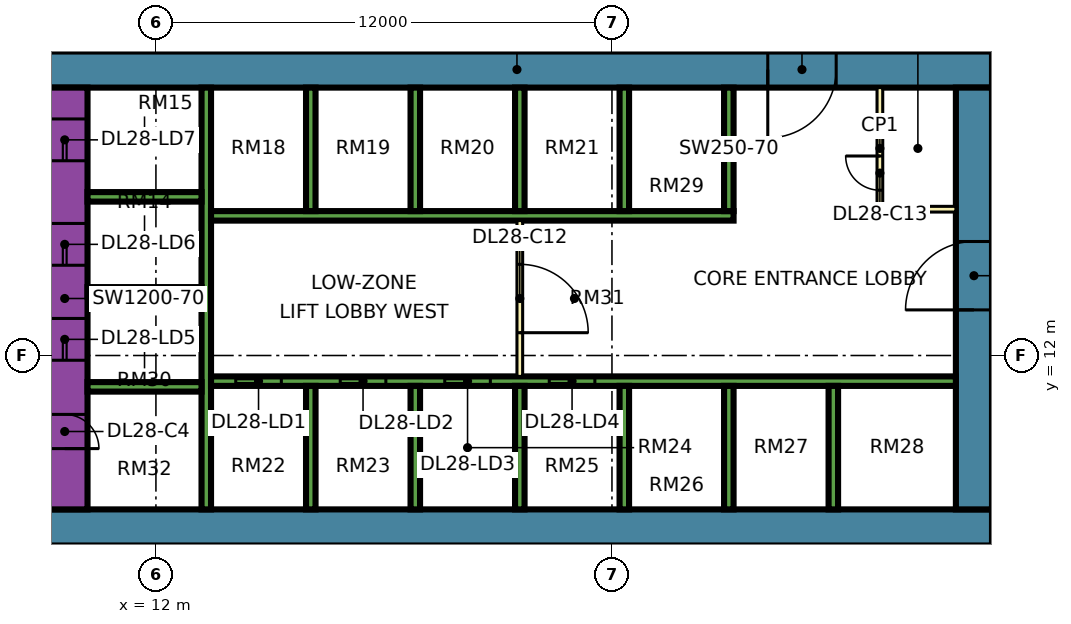
"""IFC4 building model, lengths in metres.
Left out: names, types, materials, properties, quantities, classifications, styles, units other than length and angle.
Written with IfcOpenShell. Run it as: python <this file> out.ifc"""

import sys

from ifc_helpers import new_model, si_unit, direction, frame, frame_2d, origin, place, context, subcontext, project, spatial, rectangle, extrude, element, fill, save


model = new_model("IFC4")
c1 = context("Model", 3, precision=1e-05, world=origin(), true_north=direction((0.0, 1.0)))
c2 = subcontext(c1, "Body", "Model", "MODEL_VIEW")
j1 = project(units=[si_unit("LENGTHUNIT", "METRE"), si_unit("PLANEANGLEUNIT", "RADIAN")], contexts=[c1])
p1 = place(None, origin())
s1 = spatial("IfcSite", under=j1, at=p1, CompositionType="ELEMENT")
p2 = place(p1, origin())
s2 = spatial("IfcBuilding", under=s1, at=p2, CompositionType="ELEMENT")
p3 = place(p2, frame((0.0, 0.0, 121.9)))
s3 = spatial("IfcBuildingStorey", under=s2, at=p3, CompositionType="ELEMENT", Elevation=121.9)
p4 = place(p3, frame((9.0, 7.475, 0.0), z_axis=(0.0, 0.0, 1.0), x_axis=(1.0, 0.0, 0.0)))
e1 = element("IfcWall", 1, at=p4, inside=s3, PredefinedType="SHEAR", context=c2, shape_type="SweptSolid", body=[
    extrude(rectangle(XDim=25.0, YDim=0.95, at=frame_2d((12.5, 0.0))), origin(), (0.0, 0.0, 1.0), 3.75),
])
p5 = place(p3, frame((9.0, 19.525, 0.0), z_axis=(0.0, 0.0, 1.0), x_axis=(1.0, 0.0, 0.0)))
e2 = element("IfcWall", 2, at=p5, inside=s3, PredefinedType="SHEAR", context=c2, shape_type="SweptSolid", body=[
    extrude(rectangle(XDim=25.0, YDim=0.95, at=frame_2d((12.5, 0.0))), origin(), (0.0, 0.0, 1.0), 3.75),
])
p6 = place(p5, frame((19.1, 0.0, 0.0)))
e3 = element("IfcOpeningElement", 3, at=p6, cuts=e2, PredefinedType="OPENING", context=c2, shape_type="SweptSolid", body=[
    extrude(rectangle(XDim=1.8, YDim=2.4, at=frame_2d((0.9, 1.2))), frame((0.0, 0.485, 0.0), z_axis=(0.0, -1.0, 0.0), x_axis=(1.0, 0.0, 0.0)), (0.0, 0.0, 1.0), 0.97),
])
p7 = place(p3, frame((9.6, 7.95, 0.0), z_axis=(0.0, 0.0, 1.0), x_axis=(0.0, 1.0, 0.0)))
e4 = element("IfcWall", 4, at=p7, inside=s3, PredefinedType="SHEAR", context=c2, shape_type="SweptSolid", body=[
    extrude(rectangle(XDim=11.1, YDim=1.2, at=frame_2d((5.55, 0.0))), origin(), (0.0, 0.0, 1.0), 3.75),
])
p8 = place(p7, frame((3.925, 0.0, 0.0)))
e5 = element("IfcOpeningElement", 5, at=p8, cuts=e4, PredefinedType="OPENING", context=c2, shape_type="SweptSolid", body=[
    extrude(rectangle(XDim=1.1, YDim=2.2, at=frame_2d((0.55, 1.1))), frame((0.0, 0.61, 0.0), z_axis=(0.0, -1.0, 0.0), x_axis=(1.0, 0.0, 0.0)), (0.0, 0.0, 1.0), 1.22),
])
p9 = place(p7, frame((6.425, 0.0, 0.0)))
e6 = element("IfcOpeningElement", 6, at=p9, cuts=e4, PredefinedType="OPENING", context=c2, shape_type="SweptSolid", body=[
    extrude(rectangle(XDim=1.1, YDim=2.2, at=frame_2d((0.55, 1.1))), frame((0.0, 0.61, 0.0), z_axis=(0.0, -1.0, 0.0), x_axis=(1.0, 0.0, 0.0)), (0.0, 0.0, 1.0), 1.22),
])
p10 = place(p7, frame((9.175, 0.0, 0.0)))
e7 = element("IfcOpeningElement", 7, at=p10, cuts=e4, PredefinedType="OPENING", context=c2, shape_type="SweptSolid", body=[
    extrude(rectangle(XDim=1.1, YDim=2.2, at=frame_2d((0.55, 1.1))), frame((0.0, 0.61, 0.0), z_axis=(0.0, -1.0, 0.0), x_axis=(1.0, 0.0, 0.0)), (0.0, 0.0, 1.0), 1.22),
])
p11 = place(p7, frame((1.6, 0.0, 0.0)))
e8 = element("IfcOpeningElement", 8, at=p11, cuts=e4, PredefinedType="OPENING", context=c2, shape_type="SweptSolid", body=[
    extrude(rectangle(XDim=0.9, YDim=2.1, at=frame_2d((0.45, 1.05))), frame((0.0, 0.61, 0.0), z_axis=(0.0, -1.0, 0.0), x_axis=(1.0, 0.0, 0.0)), (0.0, 0.0, 1.0), 1.22),
])
p12 = place(p3, frame((33.525, 7.95, 0.0), z_axis=(0.0, 0.0, 1.0), x_axis=(0.0, 1.0, 0.0)))
e9 = element("IfcWall", 9, at=p12, inside=s3, PredefinedType="SHEAR", context=c2, shape_type="SweptSolid", body=[
    extrude(rectangle(XDim=11.1, YDim=0.95, at=frame_2d((5.55, 0.0))), origin(), (0.0, 0.0, 1.0), 3.75),
])
p13 = place(p12, frame((5.25, 0.0, 0.0)))
e10 = element("IfcOpeningElement", 10, at=p13, cuts=e9, PredefinedType="OPENING", context=c2, shape_type="SweptSolid", body=[
    extrude(rectangle(XDim=1.8, YDim=2.4, at=frame_2d((0.9, 1.2))), frame((0.0, 0.485, 0.0), z_axis=(0.0, -1.0, 0.0), x_axis=(1.0, 0.0, 0.0)), (0.0, 0.0, 1.0), 0.97),
])
p14 = place(p3, frame((13.325, 7.95, 0.0), z_axis=(0.0, 0.0, 1.0), x_axis=(0.0, 1.0, 0.0)))
e11 = element("IfcWall", 11, at=p14, inside=s3, PredefinedType="SHEAR", context=c2, shape_type="SweptSolid", body=[
    extrude(rectangle(XDim=11.1, YDim=0.25, at=frame_2d((5.55, 0.0))), origin(), (0.0, 0.0, 1.0), 3.75),
])
p15 = place(p3, frame((13.45, 11.325, 0.0), z_axis=(0.0, 0.0, 1.0), x_axis=(1.0, 0.0, 0.0)))
e12 = element("IfcWall", 12, at=p15, inside=s3, PredefinedType="SHEAR", context=c2, shape_type="SweptSolid", body=[
    extrude(rectangle(XDim=19.6, YDim=0.25, at=frame_2d((9.8, 0.0))), origin(), (0.0, 0.0, 1.0), 3.75),
])
p16 = place(p15, frame((0.65, 0.0, 0.0)))
e13 = element("IfcOpeningElement", 13, at=p16, cuts=e12, PredefinedType="OPENING", context=c2, shape_type="SweptSolid", body=[
    extrude(rectangle(XDim=1.2, YDim=2.2, at=frame_2d((0.6, 1.1))), frame((0.0, 0.135, 0.0), z_axis=(0.0, -1.0, 0.0), x_axis=(1.0, 0.0, 0.0)), (0.0, 0.0, 1.0), 0.27),
])
p17 = place(p15, frame((3.4, 0.0, 0.0)))
e14 = element("IfcOpeningElement", 14, at=p17, cuts=e12, PredefinedType="OPENING", context=c2, shape_type="SweptSolid", body=[
    extrude(rectangle(XDim=1.2, YDim=2.2, at=frame_2d((0.6, 1.1))), frame((0.0, 0.135, 0.0), z_axis=(0.0, -1.0, 0.0), x_axis=(1.0, 0.0, 0.0)), (0.0, 0.0, 1.0), 0.27),
])
p18 = place(p15, frame((6.15, 0.0, 0.0)))
e15 = element("IfcOpeningElement", 15, at=p18, cuts=e12, PredefinedType="OPENING", context=c2, shape_type="SweptSolid", body=[
    extrude(rectangle(XDim=1.2, YDim=2.2, at=frame_2d((0.6, 1.1))), frame((0.0, 0.135, 0.0), z_axis=(0.0, -1.0, 0.0), x_axis=(1.0, 0.0, 0.0)), (0.0, 0.0, 1.0), 0.27),
])
p19 = place(p15, frame((8.9, 0.0, 0.0)))
e16 = element("IfcOpeningElement", 16, at=p19, cuts=e12, PredefinedType="OPENING", context=c2, shape_type="SweptSolid", body=[
    extrude(rectangle(XDim=1.2, YDim=2.2, at=frame_2d((0.6, 1.1))), frame((0.0, 0.135, 0.0), z_axis=(0.0, -1.0, 0.0), x_axis=(1.0, 0.0, 0.0)), (0.0, 0.0, 1.0), 0.27),
])
p20 = place(p3, frame((13.45, 15.675, 0.0), z_axis=(0.0, 0.0, 1.0), x_axis=(1.0, 0.0, 0.0)))
e17 = element("IfcWall", 17, at=p20, inside=s3, PredefinedType="SHEAR", context=c2, shape_type="SweptSolid", body=[
    extrude(rectangle(XDim=13.75, YDim=0.25, at=frame_2d((6.875, 0.0))), origin(), (0.0, 0.0, 1.0), 3.75),
])
for number, where, z_axis, x_axis in (
    (18, (10.2, 11.175, 0.0), (0.0, 0.0, 1.0), (1.0, 0.0, 0.0)),
    (19, (10.2, 13.675, 0.0), (0.0, 0.0, 1.0), (1.0, 0.0, 0.0)),
    (20, (10.2, 16.175, 0.0), (0.0, 0.0, 1.0), (1.0, 0.0, 0.0)),
):
    element("IfcWall", number, at=place(p3, frame(where, z_axis=z_axis, x_axis=x_axis)), inside=s3, PredefinedType="SHEAR", context=c2, shape_type="SweptSolid", body=[
        extrude(rectangle(XDim=3.0, YDim=0.25, at=frame_2d((1.5, 0.0))), origin(), (0.0, 0.0, 1.0), 3.75),
    ])
for number, where, z_axis, x_axis in (
    (21, (16.075, 7.95, 0.0), (0.0, 0.0, 1.0), (0.0, 1.0, 0.0)),
    (22, (18.825, 7.95, 0.0), (0.0, 0.0, 1.0), (0.0, 1.0, 0.0)),
    (23, (21.575, 7.95, 0.0), (0.0, 0.0, 1.0), (0.0, 1.0, 0.0)),
    (24, (24.325, 7.95, 0.0), (0.0, 0.0, 1.0), (0.0, 1.0, 0.0)),
    (25, (27.075, 7.95, 0.0), (0.0, 0.0, 1.0), (0.0, 1.0, 0.0)),
    (26, (29.825, 7.95, 0.0), (0.0, 0.0, 1.0), (0.0, 1.0, 0.0)),
    (27, (16.075, 15.8, 0.0), (0.0, 0.0, 1.0), (0.0, 1.0, 0.0)),
    (28, (18.825, 15.8, 0.0), (0.0, 0.0, 1.0), (0.0, 1.0, 0.0)),
    (29, (21.575, 15.8, 0.0), (0.0, 0.0, 1.0), (0.0, 1.0, 0.0)),
    (30, (24.325, 15.8, 0.0), (0.0, 0.0, 1.0), (0.0, 1.0, 0.0)),
    (31, (27.075, 15.8, 0.0), (0.0, 0.0, 1.0), (0.0, 1.0, 0.0)),
):
    element("IfcWall", number, at=place(p3, frame(where, z_axis=z_axis, x_axis=x_axis)), inside=s3, PredefinedType="SHEAR", context=c2, shape_type="SweptSolid", body=[
        extrude(rectangle(XDim=3.25, YDim=0.25, at=frame_2d((1.625, 0.0))), origin(), (0.0, 0.0, 1.0), 3.75),
    ])
p21 = place(p3, frame((-1.447, 12.553, 0.0), z_axis=(0.0, 0.0, 1.0), x_axis=(0.707106781187, -0.707106781187, 0.0)))
e32 = element("IfcWall", 32, at=p21, inside=s3, PredefinedType="SOLIDWALL", context=c2, shape_type="SweptSolid", body=[
    extrude(rectangle(XDim=19.799, YDim=0.15, at=frame_2d((9.899, 0.0))), origin(), (0.0, 0.0, 1.0), 3.35),
])
p22 = place(p21, frame((2.212, 0.0, 0.45)))
e33 = element("IfcOpeningElement", 33, at=p22, cuts=e32, PredefinedType="OPENING", context=c2, shape_type="SweptSolid", body=[
    extrude(rectangle(XDim=3.0, YDim=2.4, at=frame_2d((1.5, 1.2))), frame((0.0, 0.085, 0.0), z_axis=(0.0, -1.0, 0.0), x_axis=(1.0, 0.0, 0.0)), (0.0, 0.0, 1.0), 0.17),
])
p23 = place(p21, frame((10.216, 0.0, 0.45)))
e34 = element("IfcOpeningElement", 34, at=p23, cuts=e32, PredefinedType="OPENING", context=c2, shape_type="SweptSolid", body=[
    extrude(rectangle(XDim=3.0, YDim=2.4, at=frame_2d((1.5, 1.2))), frame((0.0, 0.085, 0.0), z_axis=(0.0, -1.0, 0.0), x_axis=(1.0, 0.0, 0.0)), (0.0, 0.0, 1.0), 0.17),
])
p24 = place(p3, frame((21.575, 11.45, 0.0), z_axis=(0.0, 0.0, 1.0), x_axis=(0.0, 1.0, 0.0)))
e35 = element("IfcWall", 35, at=p24, inside=s3, PredefinedType="PARTITIONING", context=c2, shape_type="SweptSolid", body=[
    extrude(rectangle(XDim=4.1, YDim=0.15, at=frame_2d((2.05, 0.0))), origin(), (0.0, 0.0, 1.0), 3.35),
])
p25 = place(p24, frame((1.15, 0.0, 0.0)))
e36 = element("IfcOpeningElement", 36, at=p25, cuts=e35, PredefinedType="OPENING", context=c2, shape_type="SweptSolid", body=[
    extrude(rectangle(XDim=1.8, YDim=2.4, at=frame_2d((0.9, 1.2))), frame((0.0, 0.085, 0.0), z_axis=(0.0, -1.0, 0.0), x_axis=(1.0, 0.0, 0.0)), (0.0, 0.0, 1.0), 0.17),
])
p26 = place(p3, frame((31.05, 15.85, 0.0), z_axis=(0.0, 0.0, 1.0), x_axis=(0.0, 1.0, 0.0)))
e37 = element("IfcWall", 37, at=p26, inside=s3, PredefinedType="PARTITIONING", context=c2, shape_type="SweptSolid", body=[
    extrude(rectangle(XDim=3.2, YDim=0.15, at=frame_2d((1.6, 0.0))), origin(), (0.0, 0.0, 1.0), 3.35),
])
p27 = place(p26, frame((0.5, 0.0, 0.0)))
e38 = element("IfcOpeningElement", 38, at=p27, cuts=e37, PredefinedType="OPENING", context=c2, shape_type="SweptSolid", body=[
    extrude(rectangle(XDim=0.9, YDim=2.1, at=frame_2d((0.45, 1.05))), frame((0.0, 0.085, 0.0), z_axis=(0.0, -1.0, 0.0), x_axis=(1.0, 0.0, 0.0)), (0.0, 0.0, 1.0), 0.17),
])
p28 = place(p3, frame((31.05, 15.85, 0.0), z_axis=(0.0, 0.0, 1.0), x_axis=(1.0, 0.0, 0.0)))
e39 = element("IfcWall", 39, at=p28, inside=s3, PredefinedType="PARTITIONING", context=c2, shape_type="SweptSolid", body=[
    extrude(rectangle(XDim=2.0, YDim=0.15, at=frame_2d((1.0, 0.0))), origin(), (0.0, 0.0, 1.0), 3.35),
])
p29 = place(p16, origin())
e40 = element("IfcDoor", 40, at=p29, inside=s3, OperationType="DOUBLE_DOOR_SLIDING", PredefinedType="DOOR", context=c2, shape_type="SweptSolid", body=[
    extrude(rectangle(XDim=1.2, YDim=2.2, at=frame_2d((0.6, 1.1))), frame((0.0, 0.025, 0.0), z_axis=(0.0, -1.0, 0.0), x_axis=(1.0, 0.0, 0.0)), (0.0, 0.0, 1.0), 0.05),
])
fill(e13, e40)
p30 = place(p17, origin())
e41 = element("IfcDoor", 41, at=p30, inside=s3, OperationType="DOUBLE_DOOR_SLIDING", PredefinedType="DOOR", context=c2, shape_type="SweptSolid", body=[
    extrude(rectangle(XDim=1.2, YDim=2.2, at=frame_2d((0.6, 1.1))), frame((0.0, 0.025, 0.0), z_axis=(0.0, -1.0, 0.0), x_axis=(1.0, 0.0, 0.0)), (0.0, 0.0, 1.0), 0.05),
])
fill(e14, e41)
p31 = place(p18, origin())
e42 = element("IfcDoor", 42, at=p31, inside=s3, OperationType="DOUBLE_DOOR_SLIDING", PredefinedType="DOOR", context=c2, shape_type="SweptSolid", body=[
    extrude(rectangle(XDim=1.2, YDim=2.2, at=frame_2d((0.6, 1.1))), frame((0.0, 0.025, 0.0), z_axis=(0.0, -1.0, 0.0), x_axis=(1.0, 0.0, 0.0)), (0.0, 0.0, 1.0), 0.05),
])
fill(e15, e42)
p32 = place(p19, origin())
e43 = element("IfcDoor", 43, at=p32, inside=s3, OperationType="DOUBLE_DOOR_SLIDING", PredefinedType="DOOR", context=c2, shape_type="SweptSolid", body=[
    extrude(rectangle(XDim=1.2, YDim=2.2, at=frame_2d((0.6, 1.1))), frame((0.0, 0.025, 0.0), z_axis=(0.0, -1.0, 0.0), x_axis=(1.0, 0.0, 0.0)), (0.0, 0.0, 1.0), 0.05),
])
fill(e16, e43)
p33 = place(p8, origin())
e44 = element("IfcDoor", 44, at=p33, inside=s3, OperationType="DOUBLE_DOOR_SLIDING", PredefinedType="DOOR", context=c2, shape_type="SweptSolid", body=[
    extrude(rectangle(XDim=1.1, YDim=2.2, at=frame_2d((0.55, 1.1))), frame((0.0, 0.025, 0.0), z_axis=(0.0, -1.0, 0.0), x_axis=(1.0, 0.0, 0.0)), (0.0, 0.0, 1.0), 0.05),
])
fill(e5, e44)
p34 = place(p9, origin())
e45 = element("IfcDoor", 45, at=p34, inside=s3, OperationType="DOUBLE_DOOR_SLIDING", PredefinedType="DOOR", context=c2, shape_type="SweptSolid", body=[
    extrude(rectangle(XDim=1.1, YDim=2.2, at=frame_2d((0.55, 1.1))), frame((0.0, 0.025, 0.0), z_axis=(0.0, -1.0, 0.0), x_axis=(1.0, 0.0, 0.0)), (0.0, 0.0, 1.0), 0.05),
])
fill(e6, e45)
p35 = place(p10, origin())
e46 = element("IfcDoor", 46, at=p35, inside=s3, OperationType="DOUBLE_DOOR_SLIDING", PredefinedType="DOOR", context=c2, shape_type="SweptSolid", body=[
    extrude(rectangle(XDim=1.1, YDim=2.2, at=frame_2d((0.55, 1.1))), frame((0.0, 0.025, 0.0), z_axis=(0.0, -1.0, 0.0), x_axis=(1.0, 0.0, 0.0)), (0.0, 0.0, 1.0), 0.05),
])
fill(e7, e46)
p36 = place(p13, origin())
e47 = element("IfcDoor", 47, at=p36, inside=s3, OperationType="DOUBLE_DOOR_SINGLE_SWING", PredefinedType="DOOR", context=c2, shape_type="SweptSolid", body=[
    extrude(rectangle(XDim=1.8, YDim=2.4, at=frame_2d((0.9, 1.2))), frame((0.0, 0.025, 0.0), z_axis=(0.0, -1.0, 0.0), x_axis=(1.0, 0.0, 0.0)), (0.0, 0.0, 1.0), 0.05),
])
fill(e10, e47)
p37 = place(p6, frame((1.8, 0.0, 0.0), z_axis=(0.0, 0.0, 1.0), x_axis=(-1.0, 0.0, 0.0)))
e48 = element("IfcDoor", 48, at=p37, inside=s3, OperationType="DOUBLE_DOOR_SINGLE_SWING", PredefinedType="DOOR", context=c2, shape_type="SweptSolid", body=[
    extrude(rectangle(XDim=1.8, YDim=2.4, at=frame_2d((0.9, 1.2))), frame((0.0, 0.025, 0.0), z_axis=(0.0, -1.0, 0.0), x_axis=(1.0, 0.0, 0.0)), (0.0, 0.0, 1.0), 0.05),
])
fill(e3, e48)
p38 = place(p11, frame((0.9, 0.0, 0.0), z_axis=(0.0, 0.0, 1.0), x_axis=(-1.0, 0.0, 0.0)))
e49 = element("IfcDoor", 49, at=p38, inside=s3, OperationType="SINGLE_SWING_LEFT", PredefinedType="DOOR", context=c2, shape_type="SweptSolid", body=[
    extrude(rectangle(XDim=0.9, YDim=2.1, at=frame_2d((0.45, 1.05))), frame((0.0, 0.025, 0.0), z_axis=(0.0, -1.0, 0.0), x_axis=(1.0, 0.0, 0.0)), (0.0, 0.0, 1.0), 0.05),
])
fill(e8, e49)
p39 = place(p25, frame((1.8, 0.0, 0.0), z_axis=(0.0, 0.0, 1.0), x_axis=(-1.0, 0.0, 0.0)))
e50 = element("IfcDoor", 50, at=p39, inside=s3, OperationType="DOUBLE_DOOR_SINGLE_SWING", PredefinedType="DOOR", context=c2, shape_type="SweptSolid", body=[
    extrude(rectangle(XDim=1.8, YDim=2.4, at=frame_2d((0.9, 1.2))), frame((0.0, 0.025, 0.0), z_axis=(0.0, -1.0, 0.0), x_axis=(1.0, 0.0, 0.0)), (0.0, 0.0, 1.0), 0.05),
])
fill(e36, e50)
p40 = place(p27, frame((0.9, 0.0, 0.0), z_axis=(0.0, 0.0, 1.0), x_axis=(-1.0, 0.0, 0.0)))
e51 = element("IfcDoor", 51, at=p40, inside=s3, OperationType="SINGLE_SWING_RIGHT", PredefinedType="DOOR", context=c2, shape_type="SweptSolid", body=[
    extrude(rectangle(XDim=0.9, YDim=2.1, at=frame_2d((0.45, 1.05))), frame((0.0, 0.025, 0.0), z_axis=(0.0, -1.0, 0.0), x_axis=(1.0, 0.0, 0.0)), (0.0, 0.0, 1.0), 0.05),
])
fill(e38, e51)
save(model, sys.argv[1])
